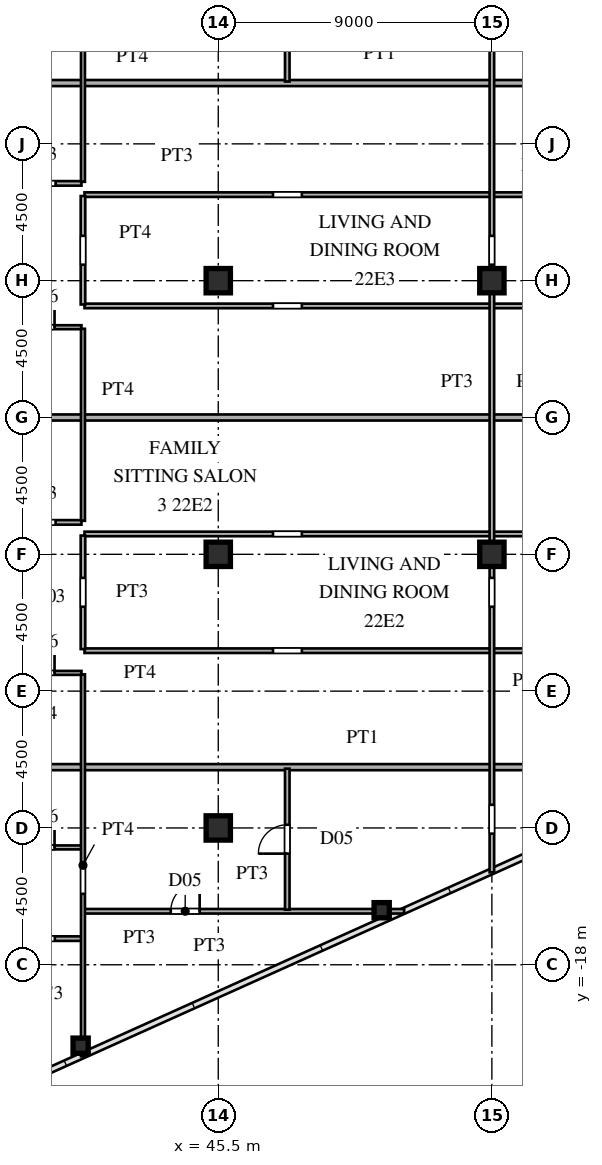
"""IFC4 building model, lengths in metres.
Left out: names, types, materials, properties, quantities, classifications, styles, units other than length and angle.
Written with IfcOpenShell. Run it as: python <this file> out.ifc"""

import sys

from ifc_helpers import new_model, si_unit, direction, frame, frame_2d, origin, origin_2d, place, context, subcontext, project, spatial, rectangle, hollow_rectangle, i_section, extrude, source, transform, mapped, element, fill, save


model = new_model("IFC4")
c1 = context("Model", 3, precision=1e-05, world=origin(), true_north=direction((0.0, 1.0)))
c2 = subcontext(c1, "Body", "Model", "MODEL_VIEW")
j1 = project(units=[si_unit("LENGTHUNIT", "METRE"), si_unit("PLANEANGLEUNIT", "RADIAN")], contexts=[c1])
p1 = place(None, origin())
s1 = spatial("IfcSite", under=j1, at=p1, CompositionType="ELEMENT")
p2 = place(p1, origin())
s2 = spatial("IfcBuilding", under=s1, at=p2, CompositionType="ELEMENT")
p3 = place(p2, frame((0.0, 0.0, 83.7)))
s3 = spatial("IfcBuildingStorey", under=s2, at=p3, CompositionType="ELEMENT", Elevation=83.7)
m1 = source(origin(), c2, "Body", "SweptSolid", [
    extrude(i_section(OverallWidth=0.8, OverallDepth=0.8, WebThickness=0.032, FlangeThickness=0.05, at=origin_2d()), origin(), (0.0, 0.0, 1.0), 3.6),
])
for number, where, z_axis, x_axis in (
    (1, (45.5, -13.5, 0.0), (0.0, 0.0, 1.0), (1.0, 0.0, 0.0)),
    (2, (45.5, -4.5, 0.0), (0.0, 0.0, 1.0), (1.0, 0.0, 0.0)),
    (3, (45.5, 4.5, 0.0), (0.0, 0.0, 1.0), (1.0, 0.0, 0.0)),
    (4, (54.5, -4.5, 0.0), (0.0, 0.0, 1.0), (1.0, 0.0, 0.0)),
    (5, (54.5, 4.5, 0.0), (0.0, 0.0, 1.0), (1.0, 0.0, 0.0)),
):
    element("IfcColumn", number, at=place(p3, frame(where, z_axis=z_axis, x_axis=x_axis)), inside=s3, PredefinedType="COLUMN", context=c2, shape_type="MappedRepresentation", body=[
        mapped(m1, transform((0.0, 0.0, 0.0), scale=1.0)),
    ])
m2 = source(origin(), c2, "Body", "SweptSolid", [
    extrude(hollow_rectangle(XDim=0.5, YDim=0.5, WallThickness=0.02, at=origin_2d()), origin(), (0.0, 0.0, 1.0), 3.6),
])
for number, where, z_axis, x_axis in (
    (6, (40.973, -20.661, 0.0), (0.0, 0.0, 1.0), (1.0, 0.0, 0.0)),
    (7, (50.875, -16.205, 0.0), (0.0, 0.0, 1.0), (1.0, 0.0, 0.0)),
):
    element("IfcColumn", number, at=place(p3, frame(where, z_axis=z_axis, x_axis=x_axis)), inside=s3, PredefinedType="COLUMN", context=c2, shape_type="MappedRepresentation", body=[
        mapped(m2, transform((0.0, 0.0, 0.0), scale=1.0)),
    ])
p4 = place(p3, frame((38.3, -17.14, 0.0), z_axis=(0.0, 0.0, 1.0), x_axis=(1.0, 0.0, 0.0)))
e8 = element("IfcWall", 8, at=p4, inside=s3, PredefinedType="PARTITIONING", context=c2, shape_type="SweptSolid", body=[
    extrude(rectangle(XDim=2.7, YDim=0.15, at=frame_2d((1.35, 0.0))), origin(), (0.0, 0.0, 1.0), 3.34),
])
p5 = place(p4, frame((0.875, 0.0, 0.0)))
e9 = element("IfcOpeningElement", 9, at=p5, cuts=e8, PredefinedType="OPENING", context=c2, shape_type="SweptSolid", body=[
    extrude(rectangle(XDim=0.95, YDim=2.15, at=frame_2d((0.475, 1.075))), frame((0.0, 0.085, 0.0), z_axis=(0.0, -1.0, 0.0), x_axis=(1.0, 0.0, 0.0)), (0.0, 0.0, 1.0), 0.17),
])
p6 = place(p3, frame((41.1, -16.24, 0.0), z_axis=(0.0, 0.0, 1.0), x_axis=(1.0, 0.0, 0.0)))
e10 = element("IfcWall", 10, at=p6, inside=s3, PredefinedType="PARTITIONING", context=c2, shape_type="SweptSolid", body=[
    extrude(rectangle(XDim=10.515, YDim=0.15, at=frame_2d((5.257, 0.0))), origin(), (0.0, 0.0, 1.0), 3.34),
])
p7 = place(p6, frame((2.837, 0.0, 0.0)))
e11 = element("IfcOpeningElement", 11, at=p7, cuts=e10, PredefinedType="OPENING", context=c2, shape_type="SweptSolid", body=[
    extrude(rectangle(XDim=0.95, YDim=2.15, at=frame_2d((0.475, 1.075))), frame((0.0, 0.085, 0.0), z_axis=(0.0, -1.0, 0.0), x_axis=(1.0, 0.0, 0.0)), (0.0, 0.0, 1.0), 0.17),
])
p8 = place(p3, frame((38.35, -14.14, 0.0), z_axis=(0.0, 0.0, 1.0), x_axis=(1.0, 0.0, 0.0)))
e12 = element("IfcWall", 12, at=p8, inside=s3, PredefinedType="PARTITIONING", context=c2, shape_type="SweptSolid", body=[
    extrude(rectangle(XDim=2.65, YDim=0.13, at=frame_2d((1.325, 0.0))), origin(), (0.0, 0.0, 1.0), 3.34),
])
p9 = place(p8, frame((0.885, 0.0, 0.0)))
e13 = element("IfcOpeningElement", 13, at=p9, cuts=e12, PredefinedType="OPENING", context=c2, shape_type="SweptSolid", body=[
    extrude(rectangle(XDim=0.88, YDim=2.1, at=frame_2d((0.44, 1.05))), frame((0.0, 0.075, 0.0), z_axis=(0.0, -1.0, 0.0), x_axis=(1.0, 0.0, 0.0)), (0.0, 0.0, 1.0), 0.15),
])
p10 = place(p3, frame((38.38, -11.5, 0.0), z_axis=(0.0, 0.0, 1.0), x_axis=(1.0, 0.0, 0.0)))
e14 = element("IfcWall", 14, at=p10, inside=s3, PredefinedType="PARTITIONING", context=c2, shape_type="SweptSolid", body=[
    extrude(rectangle(XDim=23.743, YDim=0.2, at=frame_2d((11.872, 0.0))), origin(), (0.0, 0.0, 1.0), 3.34),
])
p11 = place(p3, frame((38.35, -8.4, 0.0), z_axis=(0.0, 0.0, 1.0), x_axis=(1.0, 0.0, 0.0)))
e15 = element("IfcWall", 15, at=p11, inside=s3, PredefinedType="PARTITIONING", context=c2, shape_type="SweptSolid", body=[
    extrude(rectangle(XDim=2.65, YDim=0.13, at=frame_2d((1.325, 0.0))), origin(), (0.0, 0.0, 1.0), 3.34),
])
p12 = place(p11, frame((0.885, 0.0, 0.0)))
e16 = element("IfcOpeningElement", 16, at=p12, cuts=e15, PredefinedType="OPENING", context=c2, shape_type="SweptSolid", body=[
    extrude(rectangle(XDim=0.88, YDim=2.1, at=frame_2d((0.44, 1.05))), frame((0.0, 0.075, 0.0), z_axis=(0.0, -1.0, 0.0), x_axis=(1.0, 0.0, 0.0)), (0.0, 0.0, 1.0), 0.15),
])
p13 = place(p3, frame((41.1, -7.67, 0.0), z_axis=(0.0, 0.0, 1.0), x_axis=(1.0, 0.0, 0.0)))
e17 = element("IfcWall", 17, at=p13, inside=s3, PredefinedType="PARTITIONING", context=c2, shape_type="SweptSolid", body=[
    extrude(rectangle(XDim=29.218, YDim=0.15, at=frame_2d((14.609, 0.0))), origin(), (0.0, 0.0, 1.0), 3.34),
])
p14 = place(p13, frame((6.2, 0.0, 0.0)))
e18 = element("IfcOpeningElement", 18, at=p14, cuts=e17, PredefinedType="OPENING", context=c2, shape_type="SweptSolid", body=[
    extrude(rectangle(XDim=0.95, YDim=2.15, at=frame_2d((0.475, 1.075))), frame((0.0, 0.085, 0.0), z_axis=(0.0, -1.0, 0.0), x_axis=(1.0, 0.0, 0.0)), (0.0, 0.0, 1.0), 0.17),
])
p15 = place(p13, frame((15.775, 0.0, 0.0)))
e19 = element("IfcOpeningElement", 19, at=p15, cuts=e17, PredefinedType="OPENING", context=c2, shape_type="SweptSolid", body=[
    extrude(rectangle(XDim=0.95, YDim=2.15, at=frame_2d((0.475, 1.075))), frame((0.0, 0.085, 0.0), z_axis=(0.0, -1.0, 0.0), x_axis=(1.0, 0.0, 0.0)), (0.0, 0.0, 1.0), 0.17),
])
p16 = place(p3, frame((41.1, -3.83, 0.0), z_axis=(0.0, 0.0, 1.0), x_axis=(1.0, 0.0, 0.0)))
e20 = element("IfcWall", 20, at=p16, inside=s3, PredefinedType="PARTITIONING", context=c2, shape_type="SweptSolid", body=[
    extrude(rectangle(XDim=29.935, YDim=0.15, at=frame_2d((14.967, 0.0))), origin(), (0.0, 0.0, 1.0), 3.34),
])
p17 = place(p16, frame((6.2, 0.0, 0.0)))
e21 = element("IfcOpeningElement", 21, at=p17, cuts=e20, PredefinedType="OPENING", context=c2, shape_type="SweptSolid", body=[
    extrude(rectangle(XDim=0.95, YDim=2.15, at=frame_2d((0.475, 1.075))), frame((0.0, 0.085, 0.0), z_axis=(0.0, -1.0, 0.0), x_axis=(1.0, 0.0, 0.0)), (0.0, 0.0, 1.0), 0.17),
])
p18 = place(p16, frame((15.775, 0.0, 0.0)))
e22 = element("IfcOpeningElement", 22, at=p18, cuts=e20, PredefinedType="OPENING", context=c2, shape_type="SweptSolid", body=[
    extrude(rectangle(XDim=0.95, YDim=2.15, at=frame_2d((0.475, 1.075))), frame((0.0, 0.085, 0.0), z_axis=(0.0, -1.0, 0.0), x_axis=(1.0, 0.0, 0.0)), (0.0, 0.0, 1.0), 0.17),
])
p19 = place(p3, frame((38.35, -3.45, 0.0), z_axis=(0.0, 0.0, 1.0), x_axis=(1.0, 0.0, 0.0)))
e23 = element("IfcWall", 23, at=p19, inside=s3, PredefinedType="PARTITIONING", context=c2, shape_type="SweptSolid", body=[
    extrude(rectangle(XDim=2.65, YDim=0.15, at=frame_2d((1.325, 0.0))), origin(), (0.0, 0.0, 1.0), 3.34),
])
p20 = place(p19, frame((0.85, 0.0, 0.0)))
e24 = element("IfcOpeningElement", 24, at=p20, cuts=e23, PredefinedType="OPENING", context=c2, shape_type="SweptSolid", body=[
    extrude(rectangle(XDim=0.95, YDim=2.15, at=frame_2d((0.475, 1.075))), frame((0.0, 0.085, 0.0), z_axis=(0.0, -1.0, 0.0), x_axis=(1.0, 0.0, 0.0)), (0.0, 0.0, 1.0), 0.17),
])
p21 = place(p3, frame((38.38, 0.0, 0.0), z_axis=(0.0, 0.0, 1.0), x_axis=(1.0, 0.0, 0.0)))
e25 = element("IfcWall", 25, at=p21, inside=s3, PredefinedType="PARTITIONING", context=c2, shape_type="SweptSolid", body=[
    extrude(rectangle(XDim=25.1, YDim=0.2, at=frame_2d((12.55, 0.0))), origin(), (0.0, 0.0, 1.0), 3.34),
])
p22 = place(p3, frame((38.35, 2.97, 0.0), z_axis=(0.0, 0.0, 1.0), x_axis=(1.0, 0.0, 0.0)))
e26 = element("IfcWall", 26, at=p22, inside=s3, PredefinedType="PARTITIONING", context=c2, shape_type="SweptSolid", body=[
    extrude(rectangle(XDim=2.65, YDim=0.13, at=frame_2d((1.325, 0.0))), origin(), (0.0, 0.0, 1.0), 3.34),
])
p23 = place(p22, frame((0.885, 0.0, 0.0)))
e27 = element("IfcOpeningElement", 27, at=p23, cuts=e26, PredefinedType="OPENING", context=c2, shape_type="SweptSolid", body=[
    extrude(rectangle(XDim=0.88, YDim=2.1, at=frame_2d((0.44, 1.05))), frame((0.0, 0.075, 0.0), z_axis=(0.0, -1.0, 0.0), x_axis=(1.0, 0.0, 0.0)), (0.0, 0.0, 1.0), 0.15),
])
p24 = place(p3, frame((41.1, 3.67, 0.0), z_axis=(0.0, 0.0, 1.0), x_axis=(1.0, 0.0, 0.0)))
e28 = element("IfcWall", 28, at=p24, inside=s3, PredefinedType="PARTITIONING", context=c2, shape_type="SweptSolid", body=[
    extrude(rectangle(XDim=29.935, YDim=0.15, at=frame_2d((14.967, 0.0))), origin(), (0.0, 0.0, 1.0), 3.34),
])
p25 = place(p24, frame((6.2, 0.0, 0.0)))
e29 = element("IfcOpeningElement", 29, at=p25, cuts=e28, PredefinedType="OPENING", context=c2, shape_type="SweptSolid", body=[
    extrude(rectangle(XDim=0.95, YDim=2.15, at=frame_2d((0.475, 1.075))), frame((0.0, 0.085, 0.0), z_axis=(0.0, -1.0, 0.0), x_axis=(1.0, 0.0, 0.0)), (0.0, 0.0, 1.0), 0.17),
])
p26 = place(p24, frame((15.775, 0.0, 0.0)))
e30 = element("IfcOpeningElement", 30, at=p26, cuts=e28, PredefinedType="OPENING", context=c2, shape_type="SweptSolid", body=[
    extrude(rectangle(XDim=0.95, YDim=2.15, at=frame_2d((0.475, 1.075))), frame((0.0, 0.085, 0.0), z_axis=(0.0, -1.0, 0.0), x_axis=(1.0, 0.0, 0.0)), (0.0, 0.0, 1.0), 0.17),
])
p27 = place(p3, frame((41.1, 7.33, 0.0), z_axis=(0.0, 0.0, 1.0), x_axis=(1.0, 0.0, 0.0)))
e31 = element("IfcWall", 31, at=p27, inside=s3, PredefinedType="PARTITIONING", context=c2, shape_type="SweptSolid", body=[
    extrude(rectangle(XDim=29.775, YDim=0.15, at=frame_2d((14.887, 0.0))), origin(), (0.0, 0.0, 1.0), 3.34),
])
p28 = place(p27, frame((6.2, 0.0, 0.0)))
e32 = element("IfcOpeningElement", 32, at=p28, cuts=e31, PredefinedType="OPENING", context=c2, shape_type="SweptSolid", body=[
    extrude(rectangle(XDim=0.95, YDim=2.15, at=frame_2d((0.475, 1.075))), frame((0.0, 0.085, 0.0), z_axis=(0.0, -1.0, 0.0), x_axis=(1.0, 0.0, 0.0)), (0.0, 0.0, 1.0), 0.17),
])
p29 = place(p27, frame((15.775, 0.0, 0.0)))
e33 = element("IfcOpeningElement", 33, at=p29, cuts=e31, PredefinedType="OPENING", context=c2, shape_type="SweptSolid", body=[
    extrude(rectangle(XDim=0.95, YDim=2.15, at=frame_2d((0.475, 1.075))), frame((0.0, 0.085, 0.0), z_axis=(0.0, -1.0, 0.0), x_axis=(1.0, 0.0, 0.0)), (0.0, 0.0, 1.0), 0.17),
])
p30 = place(p3, frame((38.35, 7.7, 0.0), z_axis=(0.0, 0.0, 1.0), x_axis=(1.0, 0.0, 0.0)))
e34 = element("IfcWall", 34, at=p30, inside=s3, PredefinedType="PARTITIONING", context=c2, shape_type="SweptSolid", body=[
    extrude(rectangle(XDim=2.65, YDim=0.15, at=frame_2d((1.325, 0.0))), origin(), (0.0, 0.0, 1.0), 3.34),
])
p31 = place(p30, frame((0.85, 0.0, 0.0)))
e35 = element("IfcOpeningElement", 35, at=p31, cuts=e34, PredefinedType="OPENING", context=c2, shape_type="SweptSolid", body=[
    extrude(rectangle(XDim=0.95, YDim=2.15, at=frame_2d((0.475, 1.075))), frame((0.0, 0.085, 0.0), z_axis=(0.0, -1.0, 0.0), x_axis=(1.0, 0.0, 0.0)), (0.0, 0.0, 1.0), 0.17),
])
p32 = place(p3, frame((38.38, 11.0, 0.0), z_axis=(0.0, 0.0, 1.0), x_axis=(1.0, 0.0, 0.0)))
e36 = element("IfcWall", 36, at=p32, inside=s3, PredefinedType="PARTITIONING", context=c2, shape_type="SweptSolid", body=[
    extrude(rectangle(XDim=24.854, YDim=0.2, at=frame_2d((12.427, 0.0))), origin(), (0.0, 0.0, 1.0), 3.34),
])
p33 = place(p3, frame((41.05, -21.012, 0.0), z_axis=(0.0, 0.0, 1.0), x_axis=(0.0, 1.0, 0.0)))
e37 = element("IfcWall", 37, at=p33, inside=s3, PredefinedType="PARTITIONING", context=c2, shape_type="SweptSolid", body=[
    extrude(rectangle(XDim=12.565, YDim=0.13, at=frame_2d((6.282, 0.0))), origin(), (0.0, 0.0, 1.0), 2.94),
])
p34 = place(p33, frame((5.345, 0.0, 0.0)))
e38 = element("IfcOpeningElement", 38, at=p34, cuts=e37, PredefinedType="OPENING", context=c2, shape_type="SweptSolid", body=[
    extrude(rectangle(XDim=0.95, YDim=2.15, at=frame_2d((0.475, 1.075))), frame((0.0, 0.075, 0.0), z_axis=(0.0, -1.0, 0.0), x_axis=(1.0, 0.0, 0.0)), (0.0, 0.0, 1.0), 0.15),
])
p35 = place(p3, frame((41.05, -7.617, 0.0), z_axis=(0.0, 0.0, 1.0), x_axis=(0.0, 1.0, 0.0)))
e39 = element("IfcWall", 39, at=p35, inside=s3, PredefinedType="PARTITIONING", context=c2, shape_type="SweptSolid", body=[
    extrude(rectangle(XDim=3.734, YDim=0.15, at=frame_2d((1.867, 0.0))), origin(), (0.0, 0.0, 1.0), 2.94),
])
p36 = place(p35, frame((1.392, 0.0, 0.0)))
e40 = element("IfcOpeningElement", 40, at=p36, cuts=e39, PredefinedType="OPENING", context=c2, shape_type="SweptSolid", body=[
    extrude(rectangle(XDim=0.95, YDim=2.15, at=frame_2d((0.475, 1.075))), frame((0.0, 0.085, 0.0), z_axis=(0.0, -1.0, 0.0), x_axis=(1.0, 0.0, 0.0)), (0.0, 0.0, 1.0), 0.17),
])
p37 = place(p3, frame((41.05, -3.398, 0.0), z_axis=(0.0, 0.0, 1.0), x_axis=(0.0, 1.0, 0.0)))
e41 = element("IfcWall", 41, at=p37, inside=s3, PredefinedType="PARTITIONING", context=c2, shape_type="SweptSolid", body=[
    extrude(rectangle(XDim=6.316, YDim=0.13, at=frame_2d((3.158, 0.0))), origin(), (0.0, 0.0, 1.0), 2.94),
])
p38 = place(p3, frame((41.05, 3.717, 0.0), z_axis=(0.0, 0.0, 1.0), x_axis=(0.0, 1.0, 0.0)))
e42 = element("IfcWall", 42, at=p38, inside=s3, PredefinedType="PARTITIONING", context=c2, shape_type="SweptSolid", body=[
    extrude(rectangle(XDim=3.566, YDim=0.15, at=frame_2d((1.783, 0.0))), origin(), (0.0, 0.0, 1.0), 2.94),
])
p39 = place(p38, frame((1.308, 0.0, 0.0)))
e43 = element("IfcOpeningElement", 43, at=p39, cuts=e42, PredefinedType="OPENING", context=c2, shape_type="SweptSolid", body=[
    extrude(rectangle(XDim=0.95, YDim=2.15, at=frame_2d((0.475, 1.075))), frame((0.0, 0.085, 0.0), z_axis=(0.0, -1.0, 0.0), x_axis=(1.0, 0.0, 0.0)), (0.0, 0.0, 1.0), 0.17),
])
p40 = place(p3, frame((41.05, 7.752, 0.0), z_axis=(0.0, 0.0, 1.0), x_axis=(0.0, 1.0, 0.0)))
e44 = element("IfcWall", 44, at=p40, inside=s3, PredefinedType="PARTITIONING", context=c2, shape_type="SweptSolid", body=[
    extrude(rectangle(XDim=8.187, YDim=0.13, at=frame_2d((4.094, 0.0))), origin(), (0.0, 0.0, 1.0), 2.94),
])
p41 = place(p40, frame((6.59, 0.0, 0.0)))
e45 = element("IfcOpeningElement", 45, at=p41, cuts=e44, PredefinedType="OPENING", context=c2, shape_type="SweptSolid", body=[
    extrude(rectangle(XDim=0.95, YDim=2.15, at=frame_2d((0.475, 1.075))), frame((0.0, 0.075, 0.0), z_axis=(0.0, -1.0, 0.0), x_axis=(1.0, 0.0, 0.0)), (0.0, 0.0, 1.0), 0.15),
])
p42 = place(p3, frame((47.77, -16.189, 0.0), z_axis=(0.0, 0.0, 1.0), x_axis=(0.0, 1.0, 0.0)))
e46 = element("IfcWall", 46, at=p42, inside=s3, PredefinedType="PARTITIONING", context=c2, shape_type="SweptSolid", body=[
    extrude(rectangle(XDim=4.639, YDim=0.15, at=frame_2d((2.319, 0.0))), origin(), (0.0, 0.0, 1.0), 3.34),
])
p43 = place(p42, frame((1.844, 0.0, 0.0)))
e47 = element("IfcOpeningElement", 47, at=p43, cuts=e46, PredefinedType="OPENING", context=c2, shape_type="SweptSolid", body=[
    extrude(rectangle(XDim=0.95, YDim=2.15, at=frame_2d((0.475, 1.075))), frame((0.0, 0.085, 0.0), z_axis=(0.0, -1.0, 0.0), x_axis=(1.0, 0.0, 0.0)), (0.0, 0.0, 1.0), 0.17),
])
p44 = place(p3, frame((47.77, 11.05, 0.0), z_axis=(0.0, 0.0, 1.0), x_axis=(0.0, 1.0, 0.0)))
e48 = element("IfcWall", 48, at=p44, inside=s3, PredefinedType="PARTITIONING", context=c2, shape_type="SweptSolid", body=[
    extrude(rectangle(XDim=4.889, YDim=0.15, at=frame_2d((2.444, 0.0))), origin(), (0.0, 0.0, 1.0), 3.34),
])
p45 = place(p44, frame((1.969, 0.0, 0.0)))
e49 = element("IfcOpeningElement", 49, at=p45, cuts=e48, PredefinedType="OPENING", context=c2, shape_type="SweptSolid", body=[
    extrude(rectangle(XDim=0.95, YDim=2.15, at=frame_2d((0.475, 1.075))), frame((0.0, 0.085, 0.0), z_axis=(0.0, -1.0, 0.0), x_axis=(1.0, 0.0, 0.0)), (0.0, 0.0, 1.0), 0.17),
])
p46 = place(p3, frame((54.5, -14.96, 0.0), z_axis=(0.0, 0.0, 1.0), x_axis=(0.0, 1.0, 0.0)))
e50 = element("IfcWall", 50, at=p46, inside=s3, PredefinedType="PARTITIONING", context=c2, shape_type="SweptSolid", body=[
    extrude(rectangle(XDim=10.44, YDim=0.15, at=frame_2d((5.22, 0.0))), origin(), (0.0, 0.0, 1.0), 3.34),
])
p47 = place(p46, frame((1.272, 0.0, 0.0)))
e51 = element("IfcOpeningElement", 51, at=p47, cuts=e50, PredefinedType="OPENING", context=c2, shape_type="SweptSolid", body=[
    extrude(rectangle(XDim=0.95, YDim=2.15, at=frame_2d((0.475, 1.075))), frame((0.0, 0.085, 0.0), z_axis=(0.0, -1.0, 0.0), x_axis=(1.0, 0.0, 0.0)), (0.0, 0.0, 1.0), 0.17),
])
p48 = place(p46, frame((8.735, 0.0, 0.0)))
e52 = element("IfcOpeningElement", 52, at=p48, cuts=e50, PredefinedType="OPENING", context=c2, shape_type="SweptSolid", body=[
    extrude(rectangle(XDim=0.95, YDim=2.15, at=frame_2d((0.475, 1.075))), frame((0.0, 0.085, 0.0), z_axis=(0.0, -1.0, 0.0), x_axis=(1.0, 0.0, 0.0)), (0.0, 0.0, 1.0), 0.17),
])
p49 = place(p3, frame((54.5, -4.52, 0.0), z_axis=(0.0, 0.0, 1.0), x_axis=(0.0, 1.0, 0.0)))
e53 = element("IfcWall", 53, at=p49, inside=s3, PredefinedType="PARTITIONING", context=c2, shape_type="SweptSolid", body=[
    extrude(rectangle(XDim=9.04, YDim=0.15, at=frame_2d((4.52, 0.0))), origin(), (0.0, 0.0, 1.0), 2.44),
])
p50 = place(p3, frame((54.5, 4.52, 0.0), z_axis=(0.0, 0.0, 1.0), x_axis=(0.0, 1.0, 0.0)))
e54 = element("IfcWall", 54, at=p50, inside=s3, PredefinedType="PARTITIONING", context=c2, shape_type="SweptSolid", body=[
    extrude(rectangle(XDim=10.44, YDim=0.15, at=frame_2d((5.22, 0.0))), origin(), (0.0, 0.0, 1.0), 3.34),
])
p51 = place(p50, frame((0.505, 0.0, 0.0)))
e55 = element("IfcOpeningElement", 55, at=p51, cuts=e54, PredefinedType="OPENING", context=c2, shape_type="SweptSolid", body=[
    extrude(rectangle(XDim=0.95, YDim=2.15, at=frame_2d((0.475, 1.075))), frame((0.0, 0.085, 0.0), z_axis=(0.0, -1.0, 0.0), x_axis=(1.0, 0.0, 0.0)), (0.0, 0.0, 1.0), 0.17),
])
p52 = place(p50, frame((7.968, 0.0, 0.0)))
e56 = element("IfcOpeningElement", 56, at=p52, cuts=e54, PredefinedType="OPENING", context=c2, shape_type="SweptSolid", body=[
    extrude(rectangle(XDim=0.95, YDim=2.15, at=frame_2d((0.475, 1.075))), frame((0.0, 0.085, 0.0), z_axis=(0.0, -1.0, 0.0), x_axis=(1.0, 0.0, 0.0)), (0.0, 0.0, 1.0), 0.17),
])
m3 = source(origin(), c2, "Body", "SweptSolid", [
    extrude(rectangle(XDim=0.95, YDim=2.15, at=frame_2d((0.475, 1.075))), frame((0.0, 0.025, 0.0), z_axis=(0.0, -1.0, 0.0), x_axis=(1.0, 0.0, 0.0)), (0.0, 0.0, 1.0), 0.05),
])
p53 = place(p7, origin())
e57 = element("IfcDoor", 57, at=p53, inside=s3, OperationType="SINGLE_SWING_RIGHT", PredefinedType="DOOR", context=c2, shape_type="MappedRepresentation", body=[
    mapped(m3, transform((0.0, 0.0, 0.0), scale=1.0)),
])
fill(e11, e57)
m4 = source(origin(), c2, "Body", "SweptSolid", [
    extrude(rectangle(XDim=0.88, YDim=2.1, at=frame_2d((0.44, 1.05))), frame((0.0, 0.025, 0.0), z_axis=(0.0, -1.0, 0.0), x_axis=(1.0, 0.0, 0.0)), (0.0, 0.0, 1.0), 0.05),
])
p54 = place(p9, origin())
e58 = element("IfcDoor", 58, at=p54, inside=s3, OperationType="SINGLE_SWING_RIGHT", PredefinedType="DOOR", context=c2, shape_type="MappedRepresentation", body=[
    mapped(m4, transform((0.0, 0.0, 0.0), scale=1.0)),
])
fill(e13, e58)
p55 = place(p12, origin())
e59 = element("IfcDoor", 59, at=p55, inside=s3, OperationType="SINGLE_SWING_RIGHT", PredefinedType="DOOR", context=c2, shape_type="MappedRepresentation", body=[
    mapped(m4, transform((0.0, 0.0, 0.0), scale=1.0)),
])
fill(e16, e59)
p56 = place(p23, origin())
e60 = element("IfcDoor", 60, at=p56, inside=s3, OperationType="SINGLE_SWING_RIGHT", PredefinedType="DOOR", context=c2, shape_type="MappedRepresentation", body=[
    mapped(m4, transform((0.0, 0.0, 0.0), scale=1.0)),
])
fill(e27, e60)
p57 = place(p43, origin())
e61 = element("IfcDoor", 61, at=p57, inside=s3, OperationType="SINGLE_SWING_LEFT", PredefinedType="DOOR", context=c2, shape_type="MappedRepresentation", body=[
    mapped(m3, transform((0.0, 0.0, 0.0), scale=1.0)),
])
fill(e47, e61)
save(model, sys.argv[1])
